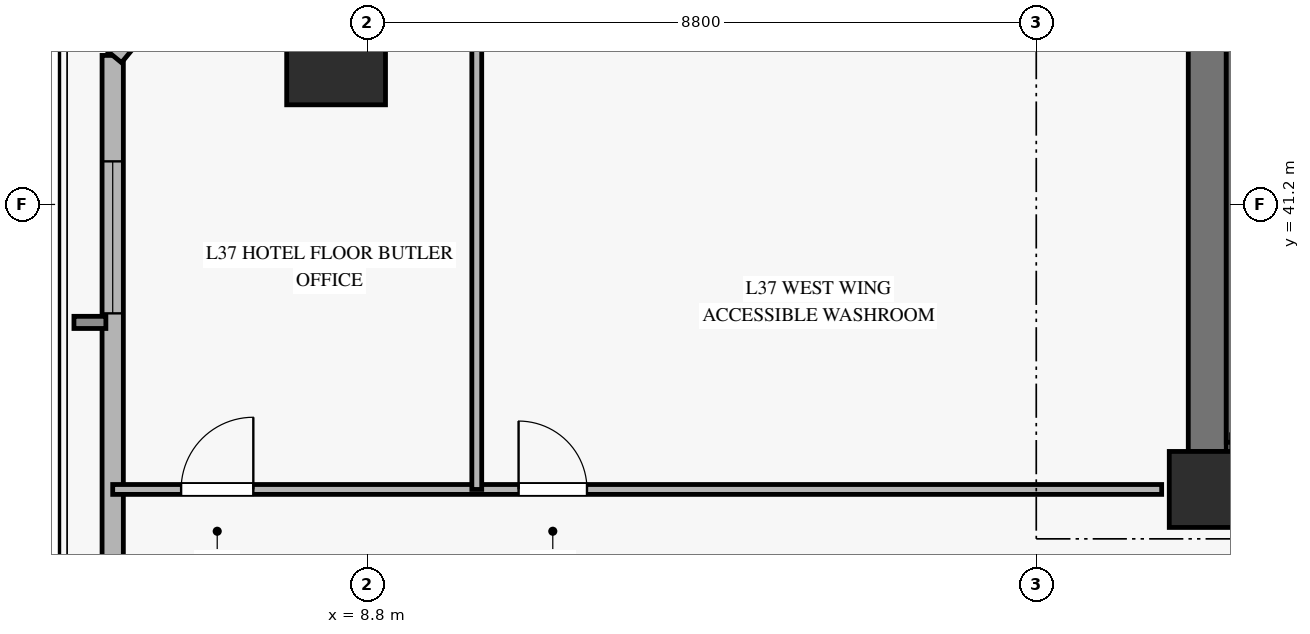
"""IFC4 building model, lengths in metres.
Left out: names, types, materials, properties, quantities, classifications, styles, units other than length and angle.
Written with IfcOpenShell. Run it as: python <this file> out.ifc"""

import sys

from ifc_helpers import new_model, si_unit, direction, frame, frame_2d, origin, origin_2d, place, context, subcontext, project, spatial, rectangle, hollow_rectangle, extrude, source, transform, mapped, element, fill, save


model = new_model("IFC4")
c1 = context("Model", 3, precision=1e-05, world=origin(), true_north=direction((0.0, 1.0)))
c2 = subcontext(c1, "Body", "Model", "MODEL_VIEW")
j1 = project(units=[si_unit("LENGTHUNIT", "METRE"), si_unit("PLANEANGLEUNIT", "RADIAN")], contexts=[c1])
p1 = place(None, origin())
s1 = spatial("IfcSite", under=j1, at=p1, CompositionType="ELEMENT")
p2 = place(p1, origin())
s2 = spatial("IfcBuilding", under=s1, at=p2, CompositionType="ELEMENT")
p3 = place(p2, frame((0.0, 0.0, 152.7)))
s3 = spatial("IfcBuildingStorey", under=s2, at=p3, CompositionType="ELEMENT", Elevation=152.7)
m1 = source(origin(), c2, "Body", "SweptSolid", [
    extrude(rectangle(XDim=1.0, YDim=1.0, at=origin_2d()), origin(), (0.0, 0.0, 1.0), 3.27),
])
p4 = place(p3, frame((19.85, 37.45, 0.0), z_axis=(0.0, 0.0, 1.0), x_axis=(1.0, 0.0, 0.0)))
e1 = element("IfcColumn", 1, at=p4, inside=s3, PredefinedType="PILASTER", context=c2, shape_type="MappedRepresentation", body=[
    mapped(m1, transform((0.0, 0.0, 0.0), x_axis=(1.0, 0.0, 0.0), y_axis=(0.0, 1.0, 0.0), z_axis=(0.0, 0.0, 1.0), scale=1.0)),
])
p5 = place(p3, frame((19.85, 37.95, 0.0), z_axis=(0.0, 0.0, 1.0), x_axis=(0.0, 1.0, 0.0)))
e2 = element("IfcWall", 2, at=p5, inside=s3, PredefinedType="SHEAR", context=c2, shape_type="SweptSolid", body=[
    extrude(rectangle(XDim=8.1, YDim=0.5, at=frame_2d((4.05, 0.0))), origin(), (0.0, 0.0, 1.0), 3.27),
])
m2 = source(origin(), c2, "Body", "SweptSolid", [
    extrude(hollow_rectangle(XDim=1.3, YDim=1.3, WallThickness=0.06, at=origin_2d()), origin(), (0.0, 0.0, 1.0), 3.27),
])
p6 = place(p3, frame((8.388, 43.161, 0.0), z_axis=(0.0, 0.0, 1.0), x_axis=(1.0, 0.0, 0.0)))
e3 = element("IfcColumn", 3, at=p6, inside=s3, PredefinedType="COLUMN", context=c2, shape_type="MappedRepresentation", body=[
    mapped(m2, transform((0.0, 0.0, 0.0), x_axis=(1.0, 0.0, 0.0), y_axis=(0.0, 1.0, 0.0), z_axis=(0.0, 0.0, 1.0), scale=1.0)),
])
p7 = place(p3, frame((5.449, 27.736, 0.0), z_axis=(0.0, 0.0, 1.0), x_axis=(0.0, 1.0, 0.0)))
e4 = element("IfcWall", 4, at=p7, inside=s3, PredefinedType="SOLIDWALL", context=c2, shape_type="SweptSolid", body=[
    extrude(rectangle(XDim=15.425, YDim=0.28, at=frame_2d((7.712, 0.0))), origin(), (0.0, 0.0, 1.0), 2.75),
])
p8 = place(p7, frame((1.325, 0.0, 0.45)))
e5 = element("IfcOpeningElement", 5, at=p8, cuts=e4, PredefinedType="OPENING", context=c2, shape_type="SweptSolid", body=[
    extrude(rectangle(XDim=2.0, YDim=2.0, at=frame_2d((1.0, 1.0))), frame((0.0, 0.15, 0.0), z_axis=(0.0, -1.0, 0.0), x_axis=(1.0, 0.0, 0.0)), (0.0, 0.0, 1.0), 0.3),
])
p9 = place(p7, frame((12.031, 0.0, 0.45)))
e6 = element("IfcOpeningElement", 6, at=p9, cuts=e4, PredefinedType="OPENING", context=c2, shape_type="SweptSolid", body=[
    extrude(rectangle(XDim=2.0, YDim=2.0, at=frame_2d((1.0, 1.0))), frame((0.0, 0.15, 0.0), z_axis=(0.0, -1.0, 0.0), x_axis=(1.0, 0.0, 0.0)), (0.0, 0.0, 1.0), 0.3),
])
p10 = place(p3, frame((7.988, 46.25, 0.0), z_axis=(0.0, 0.0, 1.0), x_axis=(-0.634975058906, -0.772532636571, 0.0)))
e7 = element("IfcWall", 7, at=p10, inside=s3, PredefinedType="SOLIDWALL", context=c2, shape_type="SweptSolid", body=[
    extrude(rectangle(XDim=3.999, YDim=0.3, at=frame_2d((2.0, 0.0))), origin(), (0.0, 0.0, 1.0), 2.75),
])
p11 = place(p10, frame((1.199, 0.0, 0.45)))
e8 = element("IfcOpeningElement", 8, at=p11, cuts=e7, PredefinedType="OPENING", context=c2, shape_type="SweptSolid", body=[
    extrude(rectangle(XDim=1.6, YDim=2.0, at=frame_2d((0.8, 1.0))), frame((0.0, 0.16, 0.0), z_axis=(0.0, -1.0, 0.0), x_axis=(1.0, 0.0, 0.0)), (0.0, 0.0, 1.0), 0.32),
])
p12 = place(p3, frame((20.17, 38.07, 0.0), z_axis=(0.0, 0.0, 1.0), x_axis=(0.0, 1.0, 0.0)))
e9 = element("IfcWall", 9, at=p12, inside=s3, PredefinedType="SOLIDWALL", context=c2, shape_type="SweptSolid", body=[
    extrude(rectangle(XDim=7.25, YDim=0.14, at=frame_2d((3.625, 0.0))), origin(), (0.0, 0.0, 1.0), 3.5),
])
p13 = place(p3, frame((5.449, 37.45, 0.0), z_axis=(0.0, 0.0, 1.0), x_axis=(1.0, 0.0, 0.0)))
e10 = element("IfcWall", 10, at=p13, inside=s3, PredefinedType="PARTITIONING", context=c2, shape_type="SweptSolid", body=[
    extrude(rectangle(XDim=13.801, YDim=0.13, at=frame_2d((6.9, 0.0))), origin(), (0.0, 0.0, 1.0), 2.755),
])
p14 = place(p13, frame((0.9, 0.0, 0.0)))
e11 = element("IfcOpeningElement", 11, at=p14, cuts=e10, PredefinedType="OPENING", context=c2, shape_type="SweptSolid", body=[
    extrude(rectangle(XDim=0.95, YDim=2.1, at=frame_2d((0.475, 1.05))), frame((0.0, 0.075, 0.0), z_axis=(0.0, -1.0, 0.0), x_axis=(1.0, 0.0, 0.0)), (0.0, 0.0, 1.0), 0.15),
])
p15 = place(p13, frame((5.34, 0.0, 0.0)))
e12 = element("IfcOpeningElement", 12, at=p15, cuts=e10, PredefinedType="OPENING", context=c2, shape_type="SweptSolid", body=[
    extrude(rectangle(XDim=0.9, YDim=2.1, at=frame_2d((0.45, 1.05))), frame((0.0, 0.075, 0.0), z_axis=(0.0, -1.0, 0.0), x_axis=(1.0, 0.0, 0.0)), (0.0, 0.0, 1.0), 0.15),
])
p16 = place(p3, frame((10.239, 37.45, 0.0), z_axis=(0.0, 0.0, 1.0), x_axis=(0.0, 1.0, 0.0)))
e13 = element("IfcWall", 13, at=p16, inside=s3, PredefinedType="PARTITIONING", context=c2, shape_type="SweptSolid", body=[
    extrude(rectangle(XDim=8.8, YDim=0.13, at=frame_2d((4.4, 0.0))), origin(), (0.0, 0.0, 1.0), 3.27),
])
m3 = source(origin(), c2, "Body", "SweptSolid", [
    extrude(rectangle(XDim=2.0, YDim=2.0, at=frame_2d((1.0, 1.0))), frame((0.0, 0.03, 0.0), z_axis=(0.0, -1.0, 0.0), x_axis=(1.0, 0.0, 0.0)), (0.0, 0.0, 1.0), 0.06),
])
p17 = place(p9, origin())
e14 = element("IfcWindow", 14, at=p17, inside=s3, PartitioningType="SINGLE_PANEL", PredefinedType="WINDOW", context=c2, shape_type="MappedRepresentation", body=[
    mapped(m3, transform((0.0, 0.0, 0.0), x_axis=(1.0, 0.0, 0.0), y_axis=(0.0, 1.0, 0.0), z_axis=(0.0, 0.0, 1.0), scale=1.0)),
])
fill(e6, e14)
m4 = source(origin(), c2, "Body", "SweptSolid", [
    extrude(rectangle(XDim=0.95, YDim=2.1, at=frame_2d((0.475, 1.05))), frame((0.0, 0.025, 0.0), z_axis=(0.0, -1.0, 0.0), x_axis=(1.0, 0.0, 0.0)), (0.0, 0.0, 1.0), 0.05),
])
p18 = place(p14, origin())
e15 = element("IfcDoor", 15, at=p18, inside=s3, OperationType="SINGLE_SWING_RIGHT", PredefinedType="DOOR", context=c2, shape_type="MappedRepresentation", body=[
    mapped(m4, transform((0.0, 0.0, 0.0), x_axis=(1.0, 0.0, 0.0), y_axis=(0.0, 1.0, 0.0), z_axis=(0.0, 0.0, 1.0), scale=1.0)),
])
fill(e11, e15)
m5 = source(origin(), c2, "Body", "SweptSolid", [
    extrude(rectangle(XDim=0.9, YDim=2.1, at=frame_2d((0.45, 1.05))), frame((0.0, 0.025, 0.0), z_axis=(0.0, -1.0, 0.0), x_axis=(1.0, 0.0, 0.0)), (0.0, 0.0, 1.0), 0.05),
])
p19 = place(p15, origin())
e16 = element("IfcDoor", 16, at=p19, inside=s3, OperationType="SINGLE_SWING_LEFT", PredefinedType="DOOR", context=c2, shape_type="MappedRepresentation", body=[
    mapped(m5, transform((0.0, 0.0, 0.0), x_axis=(1.0, 0.0, 0.0), y_axis=(0.0, 1.0, 0.0), z_axis=(0.0, 0.0, 1.0), scale=1.0)),
])
fill(e12, e16)
save(model, sys.argv[1])
